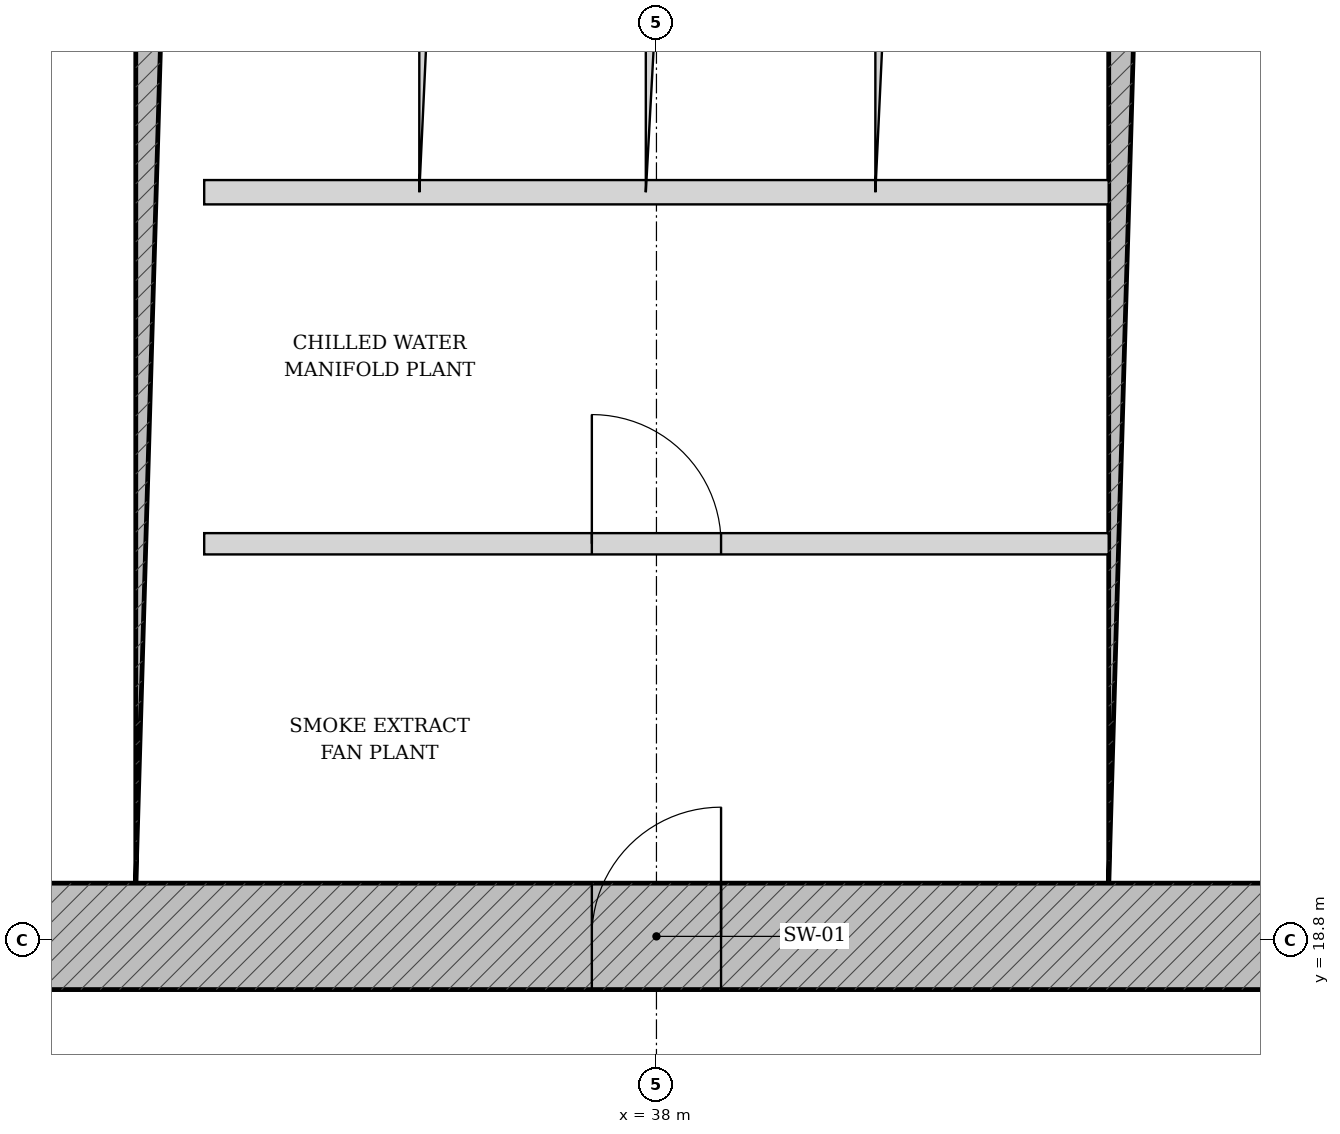
"""IFC4 building model, lengths in metres.
Left out: names, types, materials, properties, quantities, classifications, styles, units other than length and angle.
Written with IfcOpenShell. Run it as: python <this file> out.ifc"""

import sys

from ifc_helpers import new_model, si_unit, direction, frame, frame_2d, origin, place, context, subcontext, project, spatial, rectangle, extrude, source, transform, mapped, element, fill, save


model = new_model("IFC4")
c1 = context("Model", 3, precision=1e-05, world=origin(), true_north=direction((-0.2419218956, 0.970295726276)))
c2 = subcontext(c1, "Body", "Model", "MODEL_VIEW")
j1 = project(units=[si_unit("LENGTHUNIT", "METRE"), si_unit("PLANEANGLEUNIT", "RADIAN")], contexts=[c1])
p1 = place(None, origin())
s1 = spatial("IfcSite", under=j1, at=p1, CompositionType="ELEMENT")
p2 = place(p1, origin())
s2 = spatial("IfcBuilding", under=s1, at=p2, CompositionType="ELEMENT")
p3 = place(p2, frame((0.0, 0.0, 74.4)))
s3 = spatial("IfcBuildingStorey", under=s2, at=p3, CompositionType="ELEMENT", Elevation=74.4)
p4 = place(p3, frame((28.675, 18.825, 0.0), z_axis=(0.0, 0.0, 1.0), x_axis=(1.0, 0.0, 0.0)))
e1 = element("IfcWall", 1, at=p4, inside=s3, PredefinedType="SHEAR", context=c2, shape_type="SweptSolid", body=[
    extrude(rectangle(XDim=18.65, YDim=0.7, at=frame_2d((9.325, 0.0))), origin(), (0.0, 0.0, 1.0), 5.125),
])
p5 = place(p4, frame((8.9, 0.0, 0.0)))
e2 = element("IfcOpeningElement", 2, at=p5, cuts=e1, PredefinedType="OPENING", context=c2, shape_type="SweptSolid", body=[
    extrude(rectangle(XDim=0.85, YDim=2.1, at=frame_2d((0.425, 1.05))), frame((0.0, 0.36, 0.0), z_axis=(0.0, -1.0, 0.0), x_axis=(1.0, 0.0, 0.0)), (0.0, 0.0, 1.0), 0.72),
])
p6 = place(p3, frame((34.8, 19.175, 0.0), z_axis=(0.0, 0.0, 1.0), x_axis=(0.0, 1.0, 0.0)))
e3 = element("IfcWall", 3, at=p6, inside=s3, PredefinedType="SHEAR", context=c2, shape_type="SweptSolid", body=[
    extrude(rectangle(XDim=15.25, YDim=0.45, at=frame_2d((7.625, 0.0))), origin(), (0.0, 0.0, 1.0), 5.125),
])
p7 = place(p6, frame((7.8, 0.0, 0.0)))
e4 = element("IfcOpeningElement", 4, at=p7, cuts=e3, PredefinedType="OPENING", context=c2, shape_type="SweptSolid", body=[
    extrude(rectangle(XDim=1.05, YDim=2.15, at=frame_2d((0.525, 1.075))), frame((0.0, 0.235, 0.0), z_axis=(0.0, -1.0, 0.0), x_axis=(1.0, 0.0, 0.0)), (0.0, 0.0, 1.0), 0.47),
])
p8 = place(p3, frame((41.2, 19.175, 0.0), z_axis=(0.0, 0.0, 1.0), x_axis=(0.0, 1.0, 0.0)))
e5 = element("IfcWall", 5, at=p8, inside=s3, PredefinedType="SHEAR", context=c2, shape_type="SweptSolid", body=[
    extrude(rectangle(XDim=15.25, YDim=0.45, at=frame_2d((7.625, 0.0))), origin(), (0.0, 0.0, 1.0), 5.125),
])
p9 = place(p8, frame((7.8, 0.0, 0.0)))
e6 = element("IfcOpeningElement", 6, at=p9, cuts=e5, PredefinedType="OPENING", context=c2, shape_type="SweptSolid", body=[
    extrude(rectangle(XDim=1.05, YDim=2.15, at=frame_2d((0.525, 1.075))), frame((0.0, 0.235, 0.0), z_axis=(0.0, -1.0, 0.0), x_axis=(1.0, 0.0, 0.0)), (0.0, 0.0, 1.0), 0.47),
])
p10 = place(p3, frame((35.025, 23.72, 0.0), z_axis=(0.0, 0.0, 1.0), x_axis=(1.0, 0.0, 0.0)))
e7 = element("IfcWall", 7, at=p10, inside=s3, PredefinedType="PARTITIONING", context=c2, shape_type="SweptSolid", body=[
    extrude(rectangle(XDim=5.95, YDim=0.16, at=frame_2d((2.975, 0.0))), origin(), (0.0, 0.0, 1.0), 5.125),
])
p11 = place(p3, frame((36.5, 23.72, 0.0), z_axis=(0.0, 0.0, 1.0), x_axis=(0.0, 1.0, 0.0)))
e8 = element("IfcWall", 8, at=p11, inside=s3, PredefinedType="PARTITIONING", context=c2, shape_type="SweptSolid", body=[
    extrude(rectangle(XDim=2.56, YDim=0.12, at=frame_2d((1.28, 0.0))), origin(), (0.0, 0.0, 1.0), 5.125),
])
p12 = place(p3, frame((38.0, 23.72, 0.0), z_axis=(0.0, 0.0, 1.0), x_axis=(0.0, 1.0, 0.0)))
e9 = element("IfcWall", 9, at=p12, inside=s3, PredefinedType="PARTITIONING", context=c2, shape_type="SweptSolid", body=[
    extrude(rectangle(XDim=2.56, YDim=0.14, at=frame_2d((1.28, 0.0))), origin(), (0.0, 0.0, 1.0), 5.125),
])
p13 = place(p3, frame((39.5, 23.72, 0.0), z_axis=(0.0, 0.0, 1.0), x_axis=(0.0, 1.0, 0.0)))
e10 = element("IfcWall", 10, at=p13, inside=s3, PredefinedType="PARTITIONING", context=c2, shape_type="SweptSolid", body=[
    extrude(rectangle(XDim=2.56, YDim=0.12, at=frame_2d((1.28, 0.0))), origin(), (0.0, 0.0, 1.0), 5.125),
])
p14 = place(p3, frame((35.025, 21.407, 0.0), z_axis=(0.0, 0.0, 1.0), x_axis=(1.0, 0.0, 0.0)))
e11 = element("IfcWall", 11, at=p14, inside=s3, PredefinedType="PARTITIONING", context=c2, shape_type="SweptSolid", body=[
    extrude(rectangle(XDim=5.95, YDim=0.14, at=frame_2d((2.975, 0.0))), origin(), (0.0, 0.0, 1.0), 5.125),
])
p15 = place(p14, frame((2.55, 0.0, 0.0)))
e12 = element("IfcOpeningElement", 12, at=p15, cuts=e11, PredefinedType="OPENING", context=c2, shape_type="SweptSolid", body=[
    extrude(rectangle(XDim=0.85, YDim=2.1, at=frame_2d((0.425, 1.05))), frame((0.0, 0.08, 0.0), z_axis=(0.0, -1.0, 0.0), x_axis=(1.0, 0.0, 0.0)), (0.0, 0.0, 1.0), 0.16),
])
m1 = source(origin(), c2, "Body", "SweptSolid", [
    extrude(rectangle(XDim=0.85, YDim=2.1, at=frame_2d((0.425, 1.05))), frame((0.0, 0.025, 0.0), z_axis=(0.0, -1.0, 0.0), x_axis=(1.0, 0.0, 0.0)), (0.0, 0.0, 1.0), 0.05),
])
p16 = place(p5, origin())
e13 = element("IfcDoor", 13, at=p16, inside=s3, OperationType="SINGLE_SWING_RIGHT", PredefinedType="DOOR", context=c2, shape_type="MappedRepresentation", body=[
    mapped(m1, transform((0.0, 0.0, 0.0), scale=1.0)),
])
fill(e2, e13)
p17 = place(p15, origin())
e14 = element("IfcDoor", 14, at=p17, inside=s3, OperationType="SINGLE_SWING_LEFT", PredefinedType="DOOR", context=c2, shape_type="MappedRepresentation", body=[
    mapped(m1, transform((0.0, 0.0, 0.0), scale=1.0)),
])
fill(e12, e14)
save(model, sys.argv[1])
